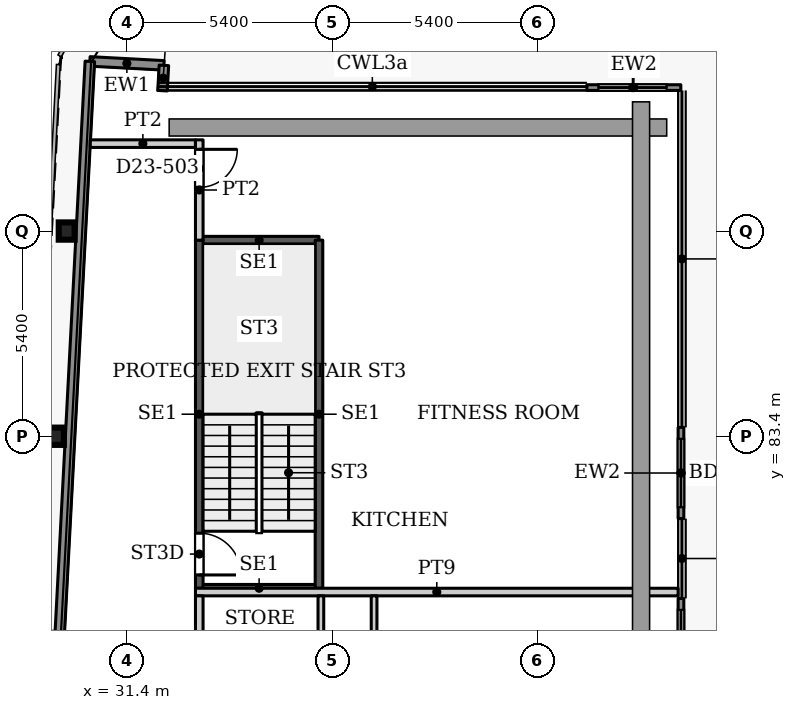
"""IFC4 building model, lengths in metres.
Left out: names, types, materials, properties, quantities, classifications, styles, units other than length and angle.
Written with IfcOpenShell. Run it as: python <this file> out.ifc"""

import sys

from ifc_helpers import new_model, si_unit, direction, frame, frame_2d, origin, origin_2d, place, context, subcontext, project, spatial, rectangle, i_section, extrude, source, transform, mapped, element, fill, save


model = new_model("IFC4")
c1 = context("Model", 3, precision=1e-05, world=origin(), true_north=direction((0.0, 1.0)))
c2 = subcontext(c1, "Body", "Model", "MODEL_VIEW")
j1 = project(units=[si_unit("LENGTHUNIT", "METRE"), si_unit("PLANEANGLEUNIT", "RADIAN")], contexts=[c1])
p1 = place(None, origin())
s1 = spatial("IfcSite", under=j1, at=p1, CompositionType="ELEMENT")
p2 = place(p1, origin())
s2 = spatial("IfcBuilding", under=s1, at=p2, CompositionType="ELEMENT")
p3 = place(p2, frame((0.0, 0.0, 105.8)))
s3 = spatial("IfcBuildingStorey", under=s2, at=p3, CompositionType="ELEMENT", Elevation=105.8)
for number, where, z_axis, x_axis in (
    (1, (29.527, 83.4, 0.0), (0.0, 0.0, 1.0), (1.0, 0.0, 0.0)),
    (2, (29.811, 88.8, 0.0), (0.0, 0.0, 1.0), (1.0, 0.0, 0.0)),
):
    element("IfcColumn", number, at=place(p3, frame(where, z_axis=z_axis, x_axis=x_axis)), inside=s3, PredefinedType="COLUMN", context=c2, shape_type="SweptSolid", body=[
        extrude(i_section(OverallWidth=0.418, OverallDepth=0.455, WebThickness=0.042, FlangeThickness=0.068, FilletRadius=0.014, at=origin_2d()), origin(), (0.0, 0.0, 1.0), 3.9),
    ])
p4 = place(p3, frame((30.421, 93.264, 0.0), z_axis=(0.0, 0.0, 1.0), x_axis=(0.998577785791, -0.053314216913, 0.0)))
e3 = element("IfcWall", 3, at=p4, inside=s3, PredefinedType="SOLIDWALL", context=c2, shape_type="SweptSolid", body=[
    extrude(rectangle(XDim=1.951, YDim=0.25, at=frame_2d((0.975, 0.0))), origin(), (0.0, 0.0, 1.0), 3.75),
])
p5 = place(p3, frame((32.369, 93.16, 0.0), z_axis=(0.0, 0.0, 1.0), x_axis=(-0.053729014033, -0.998555553312, 0.0)))
e4 = element("IfcWall", 4, at=p5, inside=s3, PredefinedType="SOLIDWALL", context=c2, shape_type="SweptSolid", body=[
    extrude(rectangle(XDim=0.668, YDim=0.25, at=frame_2d((0.334, 0.0))), origin(), (0.0, 0.0, 1.0), 3.75),
])
p6 = place(p3, frame((43.5, 92.575, 0.0), z_axis=(0.0, 0.0, 1.0), x_axis=(1.0, 0.0, 0.0)))
e5 = element("IfcWall", 5, at=p6, inside=s3, PredefinedType="SOLIDWALL", context=c2, shape_type="SweptSolid", body=[
    extrude(rectangle(XDim=2.471, YDim=0.15, at=frame_2d((1.235, 0.0))), origin(), (0.0, 0.0, 1.0), 3.75),
])
p7 = place(p6, frame((0.3, 0.0, 0.0)))
e6 = element("IfcOpeningElement", 6, at=p7, cuts=e5, PredefinedType="OPENING", context=c2, shape_type="SweptSolid", body=[
    extrude(rectangle(XDim=1.8, YDim=2.4, at=frame_2d((0.9, 1.2))), frame((0.0, 0.085, 0.0), z_axis=(0.0, -1.0, 0.0), x_axis=(1.0, 0.0, 0.0)), (0.0, 0.0, 1.0), 0.17),
])
p8 = place(p3, frame((45.975, 83.632, 0.0), z_axis=(0.0, 0.0, 1.0), x_axis=(0.0, -1.0, 0.0)))
e7 = element("IfcWall", 7, at=p8, inside=s3, PredefinedType="SOLIDWALL", context=c2, shape_type="SweptSolid", body=[
    extrude(rectangle(XDim=2.399, YDim=0.15, at=frame_2d((1.2, 0.0))), origin(), (0.0, 0.0, 1.0), 3.75),
])
p9 = place(p8, frame((0.3, 0.0, 0.0)))
e8 = element("IfcOpeningElement", 8, at=p9, cuts=e7, PredefinedType="OPENING", context=c2, shape_type="SweptSolid", body=[
    extrude(rectangle(XDim=1.8, YDim=2.4, at=frame_2d((0.9, 1.2))), frame((0.0, 0.085, 0.0), z_axis=(0.0, -1.0, 0.0), x_axis=(1.0, 0.0, 0.0)), (0.0, 0.0, 1.0), 0.17),
])
p10 = place(p3, frame((45.975, 79.132, 0.0), z_axis=(0.0, 0.0, 1.0), x_axis=(0.0, -1.0, 0.0)))
e9 = element("IfcWall", 9, at=p10, inside=s3, PredefinedType="SOLIDWALL", context=c2, shape_type="SweptSolid", body=[
    extrude(rectangle(XDim=2.399, YDim=0.15, at=frame_2d((1.2, 0.0))), origin(), (0.0, 0.0, 1.0), 3.75),
])
p11 = place(p10, frame((0.3, 0.0, 0.0)))
e10 = element("IfcOpeningElement", 10, at=p11, cuts=e9, PredefinedType="OPENING", context=c2, shape_type="SweptSolid", body=[
    extrude(rectangle(XDim=1.8, YDim=2.4, at=frame_2d((0.9, 1.2))), frame((0.0, 0.085, 0.0), z_axis=(0.0, -1.0, 0.0), x_axis=(1.0, 0.0, 0.0)), (0.0, 0.0, 1.0), 0.17),
])
p12 = place(p3, frame((27.195, 31.969, 0.0), z_axis=(0.0, 0.0, 1.0), x_axis=(0.052555284099, 0.998618016117, 0.0)))
e11 = element("IfcWall", 11, at=p12, inside=s3, PredefinedType="SOLIDWALL", context=c2, shape_type="SweptSolid", body=[
    extrude(rectangle(XDim=61.38, YDim=0.25, at=frame_2d((30.69, 0.0))), origin(), (0.0, 0.0, 1.0), 3.75),
])
for number, where, z_axis, x_axis in (
    (12, (33.3, 79.4, 0.0), (0.0, 0.0, 1.0), (1.0, 0.0, 0.0)),
    (13, (33.3, 88.56, 0.0), (0.0, 0.0, 1.0), (1.0, 0.0, 0.0)),
):
    element("IfcWall", number, at=place(p3, frame(where, z_axis=z_axis, x_axis=x_axis)), inside=s3, PredefinedType="SHEAR", context=c2, shape_type="SweptSolid", body=[
        extrude(rectangle(XDim=3.15, YDim=0.2, at=frame_2d((1.575, 0.0))), origin(), (0.0, 0.0, 1.0), 3.9),
    ])
p13 = place(p3, frame((33.3, 79.4, 0.0), z_axis=(0.0, 0.0, 1.0), x_axis=(0.0, 1.0, 0.0)))
e14 = element("IfcWall", 14, at=p13, inside=s3, PredefinedType="SHEAR", context=c2, shape_type="SweptSolid", body=[
    extrude(rectangle(XDim=9.16, YDim=0.2, at=frame_2d((4.58, 0.0))), origin(), (0.0, 0.0, 1.0), 3.9),
])
p14 = place(p13, frame((0.35, 0.0, 0.0)))
e15 = element("IfcOpeningElement", 15, at=p14, cuts=e14, PredefinedType="OPENING", context=c2, shape_type="SweptSolid", body=[
    extrude(rectangle(XDim=1.1, YDim=2.2, at=frame_2d((0.55, 1.1))), frame((0.0, 0.11, 0.0), z_axis=(0.0, -1.0, 0.0), x_axis=(1.0, 0.0, 0.0)), (0.0, 0.0, 1.0), 0.22),
])
p15 = place(p3, frame((36.45, 79.4, 0.0), z_axis=(0.0, 0.0, 1.0), x_axis=(0.0, 1.0, 0.0)))
e16 = element("IfcWall", 16, at=p15, inside=s3, PredefinedType="SHEAR", context=c2, shape_type="SweptSolid", body=[
    extrude(rectangle(XDim=9.16, YDim=0.2, at=frame_2d((4.58, 0.0))), origin(), (0.0, 0.0, 1.0), 3.9),
])
p16 = place(p3, frame((30.432, 91.1, 0.0), z_axis=(0.0, 0.0, 1.0), x_axis=(1.0, 0.0, 0.0)))
e17 = element("IfcWall", 17, at=p16, inside=s3, PredefinedType="PARTITIONING", context=c2, shape_type="SweptSolid", body=[
    extrude(rectangle(XDim=2.768, YDim=0.2, at=frame_2d((1.384, 0.0))), origin(), (0.0, 0.0, 1.0), 3.6),
])
p17 = place(p3, frame((33.2, 79.3, 0.0), z_axis=(0.0, 0.0, 1.0), x_axis=(1.0, 0.0, 0.0)))
e18 = element("IfcWall", 18, at=p17, inside=s3, PredefinedType="PARTITIONING", context=c2, shape_type="SweptSolid", body=[
    extrude(rectangle(XDim=12.7, YDim=0.2, at=frame_2d((6.35, 0.0))), origin(), (0.0, 0.0, 1.0), 3.6),
])
p18 = place(p3, frame((33.3, 54.4, 0.0), z_axis=(0.0, 0.0, 1.0), x_axis=(0.0, 1.0, 0.0)))
e19 = element("IfcWall", 19, at=p18, inside=s3, PredefinedType="PARTITIONING", context=c2, shape_type="SweptSolid", body=[
    extrude(rectangle(XDim=24.8, YDim=0.2, at=frame_2d((12.4, 0.0))), origin(), (0.0, 0.0, 1.0), 3.6),
])
p19 = place(p18, frame((0.4, 0.0, 0.0)))
e20 = element("IfcOpeningElement", 20, at=p19, cuts=e19, PredefinedType="OPENING", context=c2, shape_type="SweptSolid", body=[
    extrude(rectangle(XDim=1.0, YDim=2.1, at=frame_2d((0.5, 1.05))), frame((0.0, 0.11, 0.0), z_axis=(0.0, -1.0, 0.0), x_axis=(1.0, 0.0, 0.0)), (0.0, 0.0, 1.0), 0.22),
])
p20 = place(p18, frame((13.75, 0.0, 0.0)))
e21 = element("IfcOpeningElement", 21, at=p20, cuts=e19, PredefinedType="OPENING", context=c2, shape_type="SweptSolid", body=[
    extrude(rectangle(XDim=1.0, YDim=2.1, at=frame_2d((0.5, 1.05))), frame((0.0, 0.11, 0.0), z_axis=(0.0, -1.0, 0.0), x_axis=(1.0, 0.0, 0.0)), (0.0, 0.0, 1.0), 0.22),
])
p21 = place(p3, frame((33.3, 88.56, 0.0), z_axis=(0.0, 0.0, 1.0), x_axis=(0.0, 1.0, 0.0)))
e22 = element("IfcWall", 22, at=p21, inside=s3, PredefinedType="PARTITIONING", context=c2, shape_type="SweptSolid", body=[
    extrude(rectangle(XDim=2.64, YDim=0.2, at=frame_2d((1.32, 0.0))), origin(), (0.0, 0.0, 1.0), 3.6),
])
p22 = place(p21, frame((1.39, 0.0, 0.0)))
e23 = element("IfcOpeningElement", 23, at=p22, cuts=e22, PredefinedType="OPENING", context=c2, shape_type="SweptSolid", body=[
    extrude(rectangle(XDim=1.0, YDim=2.1, at=frame_2d((0.5, 1.05))), frame((0.0, 0.11, 0.0), z_axis=(0.0, -1.0, 0.0), x_axis=(1.0, 0.0, 0.0)), (0.0, 0.0, 1.0), 0.22),
])
p23 = place(p3, frame((36.5, 69.625, 0.0), z_axis=(0.0, 0.0, 1.0), x_axis=(0.0, 1.0, 0.0)))
e24 = element("IfcWall", 24, at=p23, inside=s3, PredefinedType="PARTITIONING", context=c2, shape_type="SweptSolid", body=[
    extrude(rectangle(XDim=9.575, YDim=0.15, at=frame_2d((4.788, 0.0))), origin(), (0.0, 0.0, 1.0), 3.6),
])
p24 = place(p23, frame((2.675, 0.0, 0.0)))
e25 = element("IfcOpeningElement", 25, at=p24, cuts=e24, PredefinedType="OPENING", context=c2, shape_type="SweptSolid", body=[
    extrude(rectangle(XDim=0.8, YDim=2.1, at=frame_2d((0.4, 1.05))), frame((0.0, 0.085, 0.0), z_axis=(0.0, -1.0, 0.0), x_axis=(1.0, 0.0, 0.0)), (0.0, 0.0, 1.0), 0.17),
])
p25 = place(p23, frame((7.425, 0.0, 0.0)))
e26 = element("IfcOpeningElement", 26, at=p25, cuts=e24, PredefinedType="OPENING", context=c2, shape_type="SweptSolid", body=[
    extrude(rectangle(XDim=0.9, YDim=2.1, at=frame_2d((0.45, 1.05))), frame((0.0, 0.085, 0.0), z_axis=(0.0, -1.0, 0.0), x_axis=(1.0, 0.0, 0.0)), (0.0, 0.0, 1.0), 0.17),
])
p26 = place(p23, frame((4.775, 0.0, 0.0)))
e27 = element("IfcOpeningElement", 27, at=p26, cuts=e24, PredefinedType="OPENING", context=c2, shape_type="SweptSolid", body=[
    extrude(rectangle(XDim=0.8, YDim=2.1, at=frame_2d((0.4, 1.05))), frame((0.0, 0.085, 0.0), z_axis=(0.0, -1.0, 0.0), x_axis=(1.0, 0.0, 0.0)), (0.0, 0.0, 1.0), 0.17),
])
p27 = place(p23, frame((0.575, 0.0, 0.0)))
e28 = element("IfcOpeningElement", 28, at=p27, cuts=e24, PredefinedType="OPENING", context=c2, shape_type="SweptSolid", body=[
    extrude(rectangle(XDim=0.8, YDim=2.1, at=frame_2d((0.4, 1.05))), frame((0.0, 0.085, 0.0), z_axis=(0.0, -1.0, 0.0), x_axis=(1.0, 0.0, 0.0)), (0.0, 0.0, 1.0), 0.17),
])
p28 = place(p3, frame((37.9, 67.7, 0.0), z_axis=(0.0, 0.0, 1.0), x_axis=(0.0, 1.0, 0.0)))
e29 = element("IfcWall", 29, at=p28, inside=s3, PredefinedType="PARTITIONING", context=c2, shape_type="SweptSolid", body=[
    extrude(rectangle(XDim=11.5, YDim=0.15, at=frame_2d((5.75, 0.0))), origin(), (0.0, 0.0, 1.0), 3.6),
])
p29 = place(p28, frame((4.55, 0.0, 0.0)))
e30 = element("IfcOpeningElement", 30, at=p29, cuts=e29, PredefinedType="OPENING", context=c2, shape_type="SweptSolid", body=[
    extrude(rectangle(XDim=0.9, YDim=2.1, at=frame_2d((0.45, 1.05))), frame((0.0, 0.085, 0.0), z_axis=(0.0, -1.0, 0.0), x_axis=(1.0, 0.0, 0.0)), (0.0, 0.0, 1.0), 0.17),
])
p30 = place(p28, frame((8.7, 0.0, 0.0)))
e31 = element("IfcOpeningElement", 31, at=p30, cuts=e29, PredefinedType="OPENING", context=c2, shape_type="SweptSolid", body=[
    extrude(rectangle(XDim=1.0, YDim=2.1, at=frame_2d((0.5, 1.05))), frame((0.0, 0.085, 0.0), z_axis=(0.0, -1.0, 0.0), x_axis=(1.0, 0.0, 0.0)), (0.0, 0.0, 1.0), 0.17),
])
p31 = place(p28, frame((1.1, 0.0, 0.0)))
e32 = element("IfcOpeningElement", 32, at=p31, cuts=e29, PredefinedType="OPENING", context=c2, shape_type="SweptSolid", body=[
    extrude(rectangle(XDim=0.9, YDim=2.1, at=frame_2d((0.45, 1.05))), frame((0.0, 0.085, 0.0), z_axis=(0.0, -1.0, 0.0), x_axis=(1.0, 0.0, 0.0)), (0.0, 0.0, 1.0), 0.17),
])
m1 = source(origin(), c2, "Body", "SweptSolid", [
    extrude(rectangle(XDim=1.8, YDim=2.4, at=frame_2d((0.9, 1.2))), frame((0.0, 0.025, 0.0), z_axis=(0.0, -1.0, 0.0), x_axis=(1.0, 0.0, 0.0)), (0.0, 0.0, 1.0), 0.05),
])
p32 = place(p7, origin())
e33 = element("IfcDoor", 33, at=p32, inside=s3, OperationType="SLIDING_TO_LEFT", PredefinedType="DOOR", context=c2, shape_type="MappedRepresentation", body=[
    mapped(m1, transform((0.0, 0.0, 0.0), x_axis=(1.0, 0.0, 0.0), y_axis=(0.0, 1.0, 0.0), z_axis=(0.0, 0.0, 1.0), scale=1.0)),
])
fill(e6, e33)
p33 = place(p9, origin())
e34 = element("IfcDoor", 34, at=p33, inside=s3, OperationType="SLIDING_TO_LEFT", PredefinedType="DOOR", context=c2, shape_type="MappedRepresentation", body=[
    mapped(m1, transform((0.0, 0.0, 0.0), x_axis=(1.0, 0.0, 0.0), y_axis=(0.0, 1.0, 0.0), z_axis=(0.0, 0.0, 1.0), scale=1.0)),
])
fill(e8, e34)
p34 = place(p11, origin())
e35 = element("IfcDoor", 35, at=p34, inside=s3, OperationType="SLIDING_TO_LEFT", PredefinedType="DOOR", context=c2, shape_type="MappedRepresentation", body=[
    mapped(m1, transform((0.0, 0.0, 0.0), x_axis=(1.0, 0.0, 0.0), y_axis=(0.0, 1.0, 0.0), z_axis=(0.0, 0.0, 1.0), scale=1.0)),
])
fill(e10, e35)
m2 = source(origin(), c2, "Body", "SweptSolid", [
    extrude(rectangle(XDim=1.1, YDim=2.2, at=frame_2d((0.55, 1.1))), frame((0.0, 0.025, 0.0), z_axis=(0.0, -1.0, 0.0), x_axis=(1.0, 0.0, 0.0)), (0.0, 0.0, 1.0), 0.05),
])
p35 = place(p14, origin())
e36 = element("IfcDoor", 36, at=p35, inside=s3, OperationType="SINGLE_SWING_RIGHT", PredefinedType="DOOR", context=c2, shape_type="MappedRepresentation", body=[
    mapped(m2, transform((0.0, 0.0, 0.0), x_axis=(1.0, 0.0, 0.0), y_axis=(0.0, 1.0, 0.0), z_axis=(0.0, 0.0, 1.0), scale=1.0)),
])
fill(e15, e36)
m3 = source(origin(), c2, "Body", "SweptSolid", [
    extrude(rectangle(XDim=1.0, YDim=2.1, at=frame_2d((0.5, 1.05))), frame((0.0, 0.025, 0.0), z_axis=(0.0, -1.0, 0.0), x_axis=(1.0, 0.0, 0.0)), (0.0, 0.0, 1.0), 0.05),
])
p36 = place(p22, origin())
e37 = element("IfcDoor", 37, at=p36, inside=s3, OperationType="SINGLE_SWING_RIGHT", PredefinedType="DOOR", context=c2, shape_type="MappedRepresentation", body=[
    mapped(m3, transform((0.0, 0.0, 0.0), x_axis=(1.0, 0.0, 0.0), y_axis=(0.0, 1.0, 0.0), z_axis=(0.0, 0.0, 1.0), scale=1.0)),
])
fill(e23, e37)
save(model, sys.argv[1])
